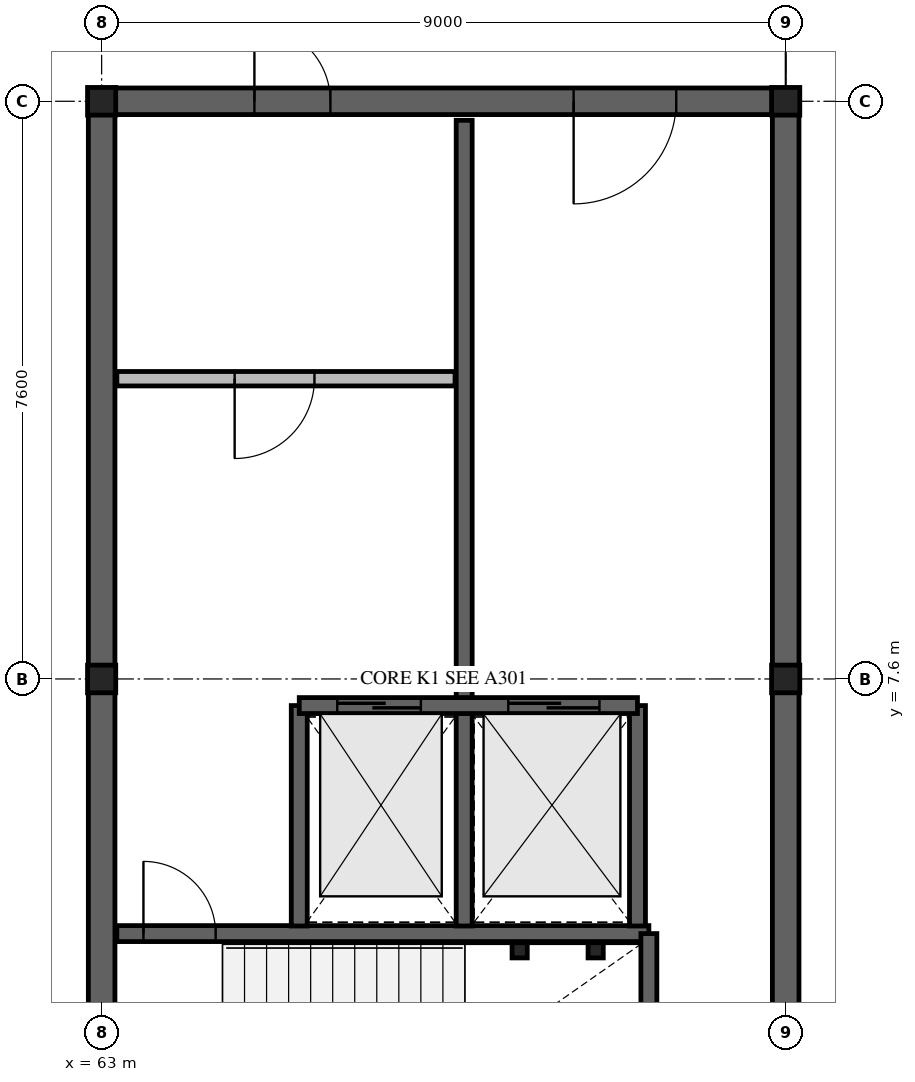
"""IFC4 building model, lengths in metres.
Left out: names, types, materials, properties, quantities, classifications, styles, units other than length and angle.
Written with IfcOpenShell. Run it as: python <this file> out.ifc"""

import sys

from ifc_helpers import new_model, si_unit, direction, frame, frame_2d, origin, origin_2d, place, context, subcontext, project, spatial, rectangle, hollow_rectangle, i_section, extrude, element, fill, save


model = new_model("IFC4")
c1 = context("Model", 3, precision=1e-05, world=origin(), true_north=direction((0.0, 1.0)))
c2 = subcontext(c1, "Body", "Model", "MODEL_VIEW")
j1 = project(units=[si_unit("LENGTHUNIT", "METRE"), si_unit("PLANEANGLEUNIT", "RADIAN")], contexts=[c1])
p1 = place(None, origin())
s1 = spatial("IfcSite", under=j1, at=p1, CompositionType="ELEMENT")
p2 = place(p1, origin())
s2 = spatial("IfcBuilding", under=s1, at=p2, CompositionType="ELEMENT")
p3 = place(p2, frame((0.0, 0.0, 5.04)))
s3 = spatial("IfcBuildingStorey", under=s2, at=p3, CompositionType="ELEMENT", Elevation=5.04)
for number, where, z_axis, x_axis in (
    (1, (63.0, 7.6, 0.0), (0.0, 0.0, 1.0), (1.0, 0.0, 0.0)),
    (2, (63.0, 15.2, 0.0), (0.0, 0.0, 1.0), (1.0, 0.0, 0.0)),
    (3, (72.0, 7.6, 0.0), (0.0, 0.0, 1.0), (1.0, 0.0, 0.0)),
    (4, (72.0, 15.2, 0.0), (0.0, 0.0, 1.0), (1.0, 0.0, 0.0)),
):
    element("IfcColumn", number, at=place(p3, frame(where, z_axis=z_axis, x_axis=x_axis)), inside=s3, PredefinedType="COLUMN", context=c2, shape_type="SweptSolid", body=[
        extrude(i_section(OverallWidth=0.371, OverallDepth=0.364, WebThickness=0.013, FlangeThickness=0.022, FilletRadius=0.018, at=origin_2d()), origin(), (0.0, 0.0, 1.0), 4.32),
    ])
p4 = place(p3, frame((63.16, 15.2, 0.0), z_axis=(0.0, 0.0, 1.0), x_axis=(1.0, 0.0, 0.0)))
e5 = element("IfcWall", 5, at=p4, inside=s3, PredefinedType="SHEAR", context=c2, shape_type="SweptSolid", body=[
    extrude(rectangle(XDim=8.68, YDim=0.35, at=frame_2d((4.34, 0.0))), origin(), (0.0, 0.0, 1.0), 4.04),
])
p5 = place(p4, frame((1.85, 0.0, 0.0)))
e6 = element("IfcOpeningElement", 6, at=p5, cuts=e5, PredefinedType="OPENING", context=c2, shape_type="SweptSolid", body=[
    extrude(rectangle(XDim=1.0, YDim=2.15, at=frame_2d((0.5, 1.075))), frame((0.0, 0.185, 0.0), z_axis=(0.0, -1.0, 0.0), x_axis=(1.0, 0.0, 0.0)), (0.0, 0.0, 1.0), 0.37),
])
p6 = place(p4, frame((6.05, 0.0, 0.0)))
e7 = element("IfcOpeningElement", 7, at=p6, cuts=e5, PredefinedType="OPENING", context=c2, shape_type="SweptSolid", body=[
    extrude(rectangle(XDim=1.35, YDim=2.18, at=frame_2d((0.675, 1.09))), frame((0.0, 0.185, 0.0), z_axis=(0.0, -1.0, 0.0), x_axis=(1.0, 0.0, 0.0)), (0.0, 0.0, 1.0), 0.37),
])
for number, where, z_axis, x_axis in (
    (8, (63.0, 0.16, 0.0), (0.0, 0.0, 1.0), (0.0, 1.0, 0.0)),
    (9, (72.0, 0.16, 0.0), (0.0, 0.0, 1.0), (0.0, 1.0, 0.0)),
):
    element("IfcWall", number, at=place(p3, frame(where, z_axis=z_axis, x_axis=x_axis)), inside=s3, PredefinedType="SHEAR", context=c2, shape_type="SweptSolid", body=[
        extrude(rectangle(XDim=14.88, YDim=0.35, at=frame_2d((7.44, 0.0))), origin(), (0.0, 0.0, 1.0), 4.04),
    ])
p7 = place(p3, frame((63.2, 4.25, 0.0), z_axis=(0.0, 0.0, 1.0), x_axis=(1.0, 0.0, 0.0)))
e10 = element("IfcWall", 10, at=p7, inside=s3, PredefinedType="SOLIDWALL", context=c2, shape_type="SweptSolid", body=[
    extrude(rectangle(XDim=7.0, YDim=0.21, at=frame_2d((3.5, 0.0))), origin(), (0.0, 0.0, 1.0), 4.04),
])
p8 = place(p7, frame((0.35, 0.0, 0.0)))
e11 = element("IfcOpeningElement", 11, at=p8, cuts=e10, PredefinedType="OPENING", context=c2, shape_type="SweptSolid", body=[
    extrude(rectangle(XDim=0.95, YDim=2.12, at=frame_2d((0.475, 1.06))), frame((0.0, 0.115, 0.0), z_axis=(0.0, -1.0, 0.0), x_axis=(1.0, 0.0, 0.0)), (0.0, 0.0, 1.0), 0.23),
])
p9 = place(p3, frame((70.2, 0.2, 0.0), z_axis=(0.0, 0.0, 1.0), x_axis=(0.0, 1.0, 0.0)))
e12 = element("IfcWall", 12, at=p9, inside=s3, PredefinedType="SOLIDWALL", context=c2, shape_type="SweptSolid", body=[
    extrude(rectangle(XDim=4.05, YDim=0.21, at=frame_2d((2.025, 0.0))), origin(), (0.0, 0.0, 1.0), 4.04),
])
p10 = place(p3, frame((65.6, 4.35, 0.0), z_axis=(0.0, 0.0, 1.0), x_axis=(0.0, 1.0, 0.0)))
e13 = element("IfcWall", 13, at=p10, inside=s3, PredefinedType="SOLIDWALL", context=c2, shape_type="SweptSolid", body=[
    extrude(rectangle(XDim=2.9, YDim=0.21, at=frame_2d((1.45, 0.0))), origin(), (0.0, 0.0, 1.0), 4.04),
])
p11 = place(p3, frame((67.77, 4.35, 0.0), z_axis=(0.0, 0.0, 1.0), x_axis=(0.0, 1.0, 0.0)))
e14 = element("IfcWall", 14, at=p11, inside=s3, PredefinedType="SOLIDWALL", context=c2, shape_type="SweptSolid", body=[
    extrude(rectangle(XDim=10.6, YDim=0.21, at=frame_2d((5.3, 0.0))), origin(), (0.0, 0.0, 1.0), 4.04),
])
p12 = place(p3, frame((70.05, 4.35, 0.0), z_axis=(0.0, 0.0, 1.0), x_axis=(0.0, 1.0, 0.0)))
e15 = element("IfcWall", 15, at=p12, inside=s3, PredefinedType="SOLIDWALL", context=c2, shape_type="SweptSolid", body=[
    extrude(rectangle(XDim=2.9, YDim=0.21, at=frame_2d((1.45, 0.0))), origin(), (0.0, 0.0, 1.0), 4.04),
])
p13 = place(p3, frame((65.6, 7.25, 0.0), z_axis=(0.0, 0.0, 1.0), x_axis=(1.0, 0.0, 0.0)))
e16 = element("IfcWall", 16, at=p13, inside=s3, PredefinedType="SOLIDWALL", context=c2, shape_type="SweptSolid", body=[
    extrude(rectangle(XDim=4.45, YDim=0.21, at=frame_2d((2.225, 0.0))), origin(), (0.0, 0.0, 1.0), 4.04),
])
p14 = place(p13, frame((0.5, 0.0, 0.0)))
e17 = element("IfcOpeningElement", 17, at=p14, cuts=e16, PredefinedType="OPENING", context=c2, shape_type="SweptSolid", body=[
    extrude(rectangle(XDim=1.1, YDim=2.14, at=frame_2d((0.55, 1.07))), frame((0.0, 0.115, 0.0), z_axis=(0.0, -1.0, 0.0), x_axis=(1.0, 0.0, 0.0)), (0.0, 0.0, 1.0), 0.23),
])
p15 = place(p13, frame((2.75, 0.0, 0.0)))
e18 = element("IfcOpeningElement", 18, at=p15, cuts=e16, PredefinedType="OPENING", context=c2, shape_type="SweptSolid", body=[
    extrude(rectangle(XDim=1.2, YDim=2.18, at=frame_2d((0.6, 1.09))), frame((0.0, 0.115, 0.0), z_axis=(0.0, -1.0, 0.0), x_axis=(1.0, 0.0, 0.0)), (0.0, 0.0, 1.0), 0.23),
])
p16 = place(p3, frame((63.2, 11.55, 0.0), z_axis=(0.0, 0.0, 1.0), x_axis=(1.0, 0.0, 0.0)))
e19 = element("IfcWall", 19, at=p16, inside=s3, PredefinedType="SOLIDWALL", context=c2, shape_type="SweptSolid", body=[
    extrude(rectangle(XDim=4.45, YDim=0.19, at=frame_2d((2.225, 0.0))), origin(), (0.0, 0.0, 1.0), 4.04),
])
p17 = place(p16, frame((1.55, 0.0, 0.0)))
e20 = element("IfcOpeningElement", 20, at=p17, cuts=e19, PredefinedType="OPENING", context=c2, shape_type="SweptSolid", body=[
    extrude(rectangle(XDim=1.05, YDim=2.12, at=frame_2d((0.525, 1.06))), frame((0.0, 0.105, 0.0), z_axis=(0.0, -1.0, 0.0), x_axis=(1.0, 0.0, 0.0)), (0.0, 0.0, 1.0), 0.21),
])
for number, where, z_axis, x_axis in (
    (21, (68.5, 4.03, 0.0), (0.0, 0.0, 1.0), (1.0, 0.0, 0.0)),
    (22, (69.5, 4.03, 0.0), (0.0, 0.0, 1.0), (1.0, 0.0, 0.0)),
):
    element("IfcColumn", number, at=place(p3, frame(where, z_axis=z_axis, x_axis=x_axis)), inside=s3, PredefinedType="COLUMN", context=c2, shape_type="SweptSolid", body=[
        extrude(hollow_rectangle(XDim=0.2, YDim=0.2, WallThickness=0.012, at=origin_2d()), origin(), (0.0, 0.0, 1.0), 4.32),
    ])
p18 = place(p8, origin())
e23 = element("IfcDoor", 23, at=p18, inside=s3, OperationType="SINGLE_SWING_LEFT", PredefinedType="DOOR", context=c2, shape_type="SweptSolid", body=[
    extrude(rectangle(XDim=0.95, YDim=2.12, at=frame_2d((0.475, 1.06))), frame((0.0, 0.025, 0.0), z_axis=(0.0, -1.0, 0.0), x_axis=(1.0, 0.0, 0.0)), (0.0, 0.0, 1.0), 0.05),
])
fill(e11, e23)
p19 = place(p14, origin())
e24 = element("IfcDoor", 24, at=p19, inside=s3, OperationType="SLIDING_TO_LEFT", PredefinedType="DOOR", context=c2, shape_type="SweptSolid", body=[
    extrude(rectangle(XDim=1.1, YDim=2.14, at=frame_2d((0.55, 1.07))), frame((0.0, 0.025, 0.0), z_axis=(0.0, -1.0, 0.0), x_axis=(1.0, 0.0, 0.0)), (0.0, 0.0, 1.0), 0.05),
])
fill(e17, e24)
p20 = place(p15, origin())
e25 = element("IfcDoor", 25, at=p20, inside=s3, OperationType="SLIDING_TO_LEFT", PredefinedType="DOOR", context=c2, shape_type="SweptSolid", body=[
    extrude(rectangle(XDim=1.2, YDim=2.18, at=frame_2d((0.6, 1.09))), frame((0.0, 0.025, 0.0), z_axis=(0.0, -1.0, 0.0), x_axis=(1.0, 0.0, 0.0)), (0.0, 0.0, 1.0), 0.05),
])
fill(e18, e25)
p21 = place(p17, origin())
e26 = element("IfcDoor", 26, at=p21, inside=s3, OperationType="SINGLE_SWING_RIGHT", PredefinedType="DOOR", context=c2, shape_type="SweptSolid", body=[
    extrude(rectangle(XDim=1.05, YDim=2.12, at=frame_2d((0.525, 1.06))), frame((0.0, 0.025, 0.0), z_axis=(0.0, -1.0, 0.0), x_axis=(1.0, 0.0, 0.0)), (0.0, 0.0, 1.0), 0.05),
])
fill(e20, e26)
p22 = place(p5, origin())
e27 = element("IfcDoor", 27, at=p22, inside=s3, OperationType="SINGLE_SWING_LEFT", PredefinedType="DOOR", context=c2, shape_type="SweptSolid", body=[
    extrude(rectangle(XDim=1.0, YDim=2.15, at=frame_2d((0.5, 1.075))), frame((0.0, 0.025, 0.0), z_axis=(0.0, -1.0, 0.0), x_axis=(1.0, 0.0, 0.0)), (0.0, 0.0, 1.0), 0.05),
])
fill(e6, e27)
p23 = place(p6, origin())
e28 = element("IfcDoor", 28, at=p23, inside=s3, OperationType="SINGLE_SWING_RIGHT", PredefinedType="DOOR", context=c2, shape_type="SweptSolid", body=[
    extrude(rectangle(XDim=1.35, YDim=2.18, at=frame_2d((0.675, 1.09))), frame((0.0, 0.025, 0.0), z_axis=(0.0, -1.0, 0.0), x_axis=(1.0, 0.0, 0.0)), (0.0, 0.0, 1.0), 0.05),
])
fill(e7, e28)
save(model, sys.argv[1])
